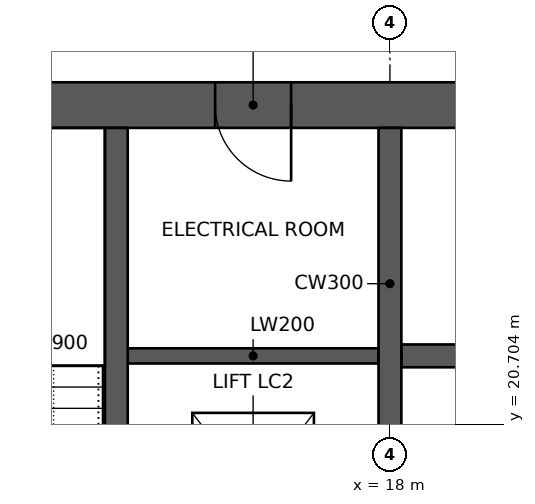
"""IFC4 building model, lengths in metres.
Left out: names, types, materials, properties, quantities, classifications, styles, units other than length and angle.
Written with IfcOpenShell. Run it as: python <this file> out.ifc"""

import sys

from ifc_helpers import new_model, si_unit, direction, frame, frame_2d, origin, place, context, subcontext, project, spatial, rectangle, extrude, element, fill, save


model = new_model("IFC4")
c1 = context("Model", 3, precision=1e-05, world=origin(), true_north=direction((0.0, 1.0)))
c2 = subcontext(c1, "Body", "Model", "MODEL_VIEW")
j1 = project(units=[si_unit("LENGTHUNIT", "METRE"), si_unit("PLANEANGLEUNIT", "RADIAN")], contexts=[c1])
p1 = place(None, origin())
s1 = spatial("IfcSite", under=j1, at=p1, CompositionType="ELEMENT")
p2 = place(p1, origin())
s2 = spatial("IfcBuilding", under=s1, at=p2, CompositionType="ELEMENT")
p3 = place(p2, frame((0.0, 0.0, 269.8)))
s3 = spatial("IfcBuildingStorey", under=s2, at=p3, CompositionType="ELEMENT", Elevation=269.8)
p4 = place(p3, frame((10.8, 24.9, 0.0), z_axis=(0.0, 0.0, 1.0), x_axis=(1.0, 0.0, 0.0)))
e1 = element("IfcWall", 1, at=p4, inside=s3, PredefinedType="SHEAR", context=c2, shape_type="SweptSolid", body=[
    extrude(rectangle(XDim=23.4, YDim=0.6, at=frame_2d((11.7, 0.0))), origin(), (0.0, 0.0, 1.0), 5.0),
])
p5 = place(p4, frame((17.2, 0.0, 0.0)))
e2 = element("IfcOpeningElement", 2, at=p5, cuts=e1, PredefinedType="OPENING", context=c2, shape_type="SweptSolid", body=[
    extrude(rectangle(XDim=1.8, YDim=2.1, at=frame_2d((0.9, 1.05))), frame((0.0, 0.31, 0.0), z_axis=(0.0, -1.0, 0.0), x_axis=(1.0, 0.0, 0.0)), (0.0, 0.0, 1.0), 0.62),
])
p6 = place(p4, frame((21.1, 0.0, 0.0)))
e3 = element("IfcOpeningElement", 3, at=p6, cuts=e1, PredefinedType="OPENING", context=c2, shape_type="SweptSolid", body=[
    extrude(rectangle(XDim=1.0, YDim=2.1, at=frame_2d((0.5, 1.05))), frame((0.0, 0.31, 0.0), z_axis=(0.0, -1.0, 0.0), x_axis=(1.0, 0.0, 0.0)), (0.0, 0.0, 1.0), 0.62),
])
p7 = place(p4, frame((4.9, 0.0, 0.0)))
e4 = element("IfcOpeningElement", 4, at=p7, cuts=e1, PredefinedType="OPENING", context=c2, shape_type="SweptSolid", body=[
    extrude(rectangle(XDim=1.0, YDim=2.1, at=frame_2d((0.5, 1.05))), frame((0.0, 0.31, 0.0), z_axis=(0.0, -1.0, 0.0), x_axis=(1.0, 0.0, 0.0)), (0.0, 0.0, 1.0), 0.62),
])
p8 = place(p3, frame((14.4, 11.4, 0.0), z_axis=(0.0, 0.0, 1.0), x_axis=(0.0, 1.0, 0.0)))
e5 = element("IfcWall", 5, at=p8, inside=s3, PredefinedType="SHEAR", context=c2, shape_type="SweptSolid", body=[
    extrude(rectangle(XDim=13.2, YDim=0.3, at=frame_2d((6.6, 0.0))), origin(), (0.0, 0.0, 1.0), 5.0),
])
p9 = place(p3, frame((18.0, 11.4, 0.0), z_axis=(0.0, 0.0, 1.0), x_axis=(0.0, 1.0, 0.0)))
e6 = element("IfcWall", 6, at=p9, inside=s3, PredefinedType="SHEAR", context=c2, shape_type="SweptSolid", body=[
    extrude(rectangle(XDim=13.2, YDim=0.3, at=frame_2d((6.6, 0.0))), origin(), (0.0, 0.0, 1.0), 5.0),
])
p10 = place(p9, frame((3.6, 0.0, 0.0)))
e7 = element("IfcOpeningElement", 7, at=p10, cuts=e6, PredefinedType="OPENING", context=c2, shape_type="SweptSolid", body=[
    extrude(rectangle(XDim=1.0, YDim=2.1, at=frame_2d((0.5, 1.05))), frame((0.0, 0.16, 0.0), z_axis=(0.0, -1.0, 0.0), x_axis=(1.0, 0.0, 0.0)), (0.0, 0.0, 1.0), 0.32),
])
p11 = place(p9, frame((7.85, 0.0, 0.0)))
e8 = element("IfcOpeningElement", 8, at=p11, cuts=e6, PredefinedType="OPENING", context=c2, shape_type="SweptSolid", body=[
    extrude(rectangle(XDim=1.1, YDim=2.1, at=frame_2d((0.55, 1.05))), frame((0.0, 0.16, 0.0), z_axis=(0.0, -1.0, 0.0), x_axis=(1.0, 0.0, 0.0)), (0.0, 0.0, 1.0), 0.32),
])
p12 = place(p3, frame((18.15, 21.6, 0.0), z_axis=(0.0, 0.0, 1.0), x_axis=(1.0, 0.0, 0.0)))
e9 = element("IfcWall", 9, at=p12, inside=s3, PredefinedType="SHEAR", context=c2, shape_type="SweptSolid", body=[
    extrude(rectangle(XDim=9.0, YDim=0.3, at=frame_2d((4.5, 0.0))), origin(), (0.0, 0.0, 1.0), 5.0),
])
p13 = place(p12, frame((6.75, 0.0, 0.0)))
e10 = element("IfcOpeningElement", 10, at=p13, cuts=e9, PredefinedType="OPENING", context=c2, shape_type="SweptSolid", body=[
    extrude(rectangle(XDim=1.2, YDim=2.1, at=frame_2d((0.6, 1.05))), frame((0.0, 0.16, 0.0), z_axis=(0.0, -1.0, 0.0), x_axis=(1.0, 0.0, 0.0)), (0.0, 0.0, 1.0), 0.32),
])
p14 = place(p12, frame((0.8, 0.0, 0.0)))
e11 = element("IfcOpeningElement", 11, at=p14, cuts=e9, PredefinedType="OPENING", context=c2, shape_type="SweptSolid", body=[
    extrude(rectangle(XDim=1.1, YDim=2.1, at=frame_2d((0.55, 1.05))), frame((0.0, 0.16, 0.0), z_axis=(0.0, -1.0, 0.0), x_axis=(1.0, 0.0, 0.0)), (0.0, 0.0, 1.0), 0.32),
])
p15 = place(p12, frame((3.8, 0.0, 0.0)))
e12 = element("IfcOpeningElement", 12, at=p15, cuts=e9, PredefinedType="OPENING", context=c2, shape_type="SweptSolid", body=[
    extrude(rectangle(XDim=1.1, YDim=2.1, at=frame_2d((0.55, 1.05))), frame((0.0, 0.16, 0.0), z_axis=(0.0, -1.0, 0.0), x_axis=(1.0, 0.0, 0.0)), (0.0, 0.0, 1.0), 0.32),
])
p16 = place(p3, frame((14.55, 21.6, 0.0), z_axis=(0.0, 0.0, 1.0), x_axis=(1.0, 0.0, 0.0)))
e13 = element("IfcWall", 13, at=p16, inside=s3, PredefinedType="SHEAR", context=c2, shape_type="SweptSolid", body=[
    extrude(rectangle(XDim=3.3, YDim=0.2, at=frame_2d((1.65, 0.0))), origin(), (0.0, 0.0, 1.0), 5.0),
])
p17 = place(p7, frame((1.0, 0.0, 0.0), z_axis=(0.0, 0.0, 1.0), x_axis=(-1.0, 0.0, 0.0)))
e14 = element("IfcDoor", 14, at=p17, inside=s3, OperationType="SINGLE_SWING_LEFT", PredefinedType="DOOR", context=c2, shape_type="SweptSolid", body=[
    extrude(rectangle(XDim=1.0, YDim=2.1, at=frame_2d((0.5, 1.05))), frame((0.0, 0.025, 0.0), z_axis=(0.0, -1.0, 0.0), x_axis=(1.0, 0.0, 0.0)), (0.0, 0.0, 1.0), 0.05),
])
fill(e4, e14)
save(model, sys.argv[1])
